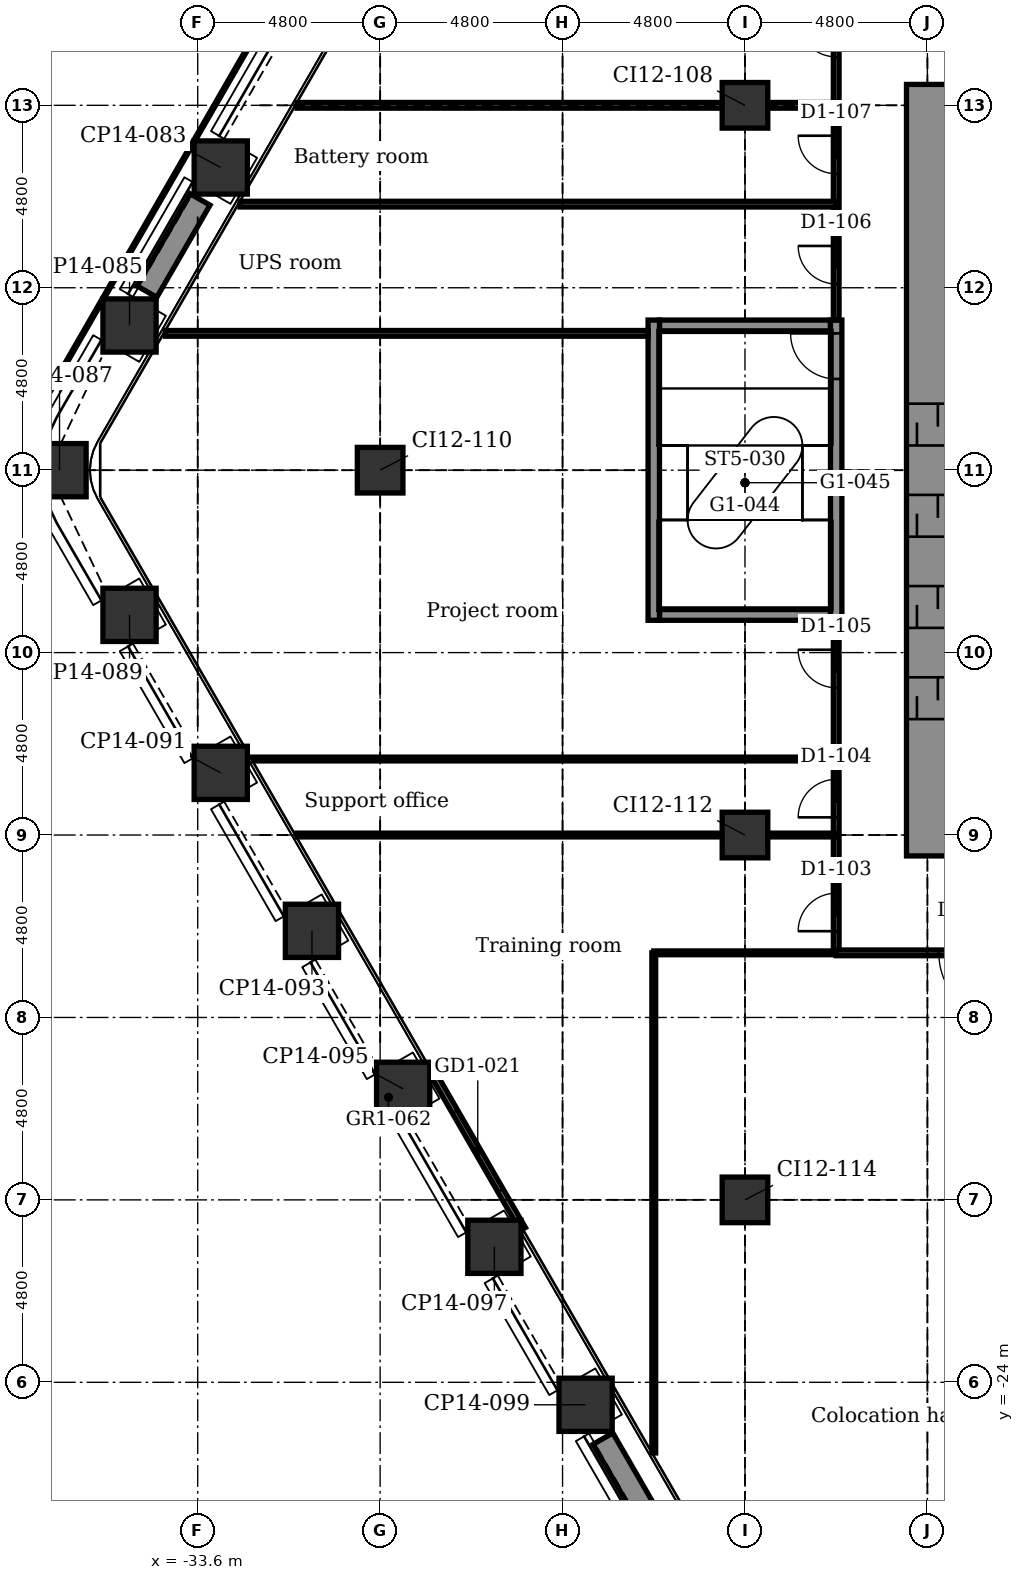
"""IFC4 building model, lengths in metres.
Left out: names, types, materials, properties, quantities, classifications, styles, units other than length and angle.
Written with IfcOpenShell. Run it as: python <this file> out.ifc"""

import sys

from ifc_helpers import new_model, si_unit, direction, frame, frame_2d, origin, origin_2d, place, context, subcontext, project, spatial, rectangle, extrude, element, fill, save


model = new_model("IFC4")
c1 = context("Model", 3, precision=1e-05, world=origin(), true_north=direction((0.0, 1.0)))
c2 = subcontext(c1, "Body", "Model", "MODEL_VIEW")
j1 = project(units=[si_unit("LENGTHUNIT", "METRE"), si_unit("PLANEANGLEUNIT", "RADIAN")], contexts=[c1])
p1 = place(None, origin())
s1 = spatial("IfcSite", under=j1, at=p1, CompositionType="ELEMENT")
p2 = place(p1, origin())
s2 = spatial("IfcBuilding", under=s1, at=p2, CompositionType="ELEMENT")
p3 = place(p2, frame((0.0, 0.0, 38.9)))
s3 = spatial("IfcBuildingStorey", under=s2, at=p3, CompositionType="ELEMENT", Elevation=38.9)
for number, where, z_axis, x_axis in (
    (1, (-23.394, -24.592, -0.25), (0.0, 0.0, 1.0), (0.866, 0.5, 0.0)),
    (2, (-25.794, -20.435, -0.25), (0.0, 0.0, 1.0), (0.866, 0.5, 0.0)),
    (3, (-28.194, -16.278, -0.25), (0.0, 0.0, 1.0), (0.866, 0.5, 0.0)),
    (4, (-30.594, -12.121, -0.25), (0.0, 0.0, 1.0), (0.866, 0.5, 0.0)),
    (5, (-32.994, -7.964, -0.25), (0.0, 0.0, 1.0), (0.866, 0.5, 0.0)),
    (6, (-35.394, -3.807, -0.25), (0.0, 0.0, 1.0), (0.866, 0.5, 0.0)),
    (7, (-37.236, 0.0, -0.25), (0.0, 0.0, 1.0), (1.0, 0.0, 0.0)),
    (8, (-35.394, 3.807, -0.25), (0.0, 0.0, 1.0), (0.5, 0.866, 0.0)),
    (9, (-32.994, 7.964, -0.25), (0.0, 0.0, 1.0), (0.5, 0.866, 0.0)),
):
    element("IfcColumn", number, at=place(p3, frame(where, z_axis=z_axis, x_axis=x_axis)), inside=s3, PredefinedType="COLUMN", context=c2, shape_type="SweptSolid", body=[
        extrude(rectangle(XDim=1.4, YDim=1.4, at=origin_2d()), origin(), (0.0, 0.0, 1.0), 5.5),
    ])
for number, where, z_axis, x_axis in (
    (10, (-28.8, 0.0, -0.25), (0.0, 0.0, 1.0), (1.0, 0.0, 0.0)),
    (11, (-19.2, -19.2, -0.25), (0.0, 0.0, 1.0), (1.0, 0.0, 0.0)),
    (12, (-19.2, -9.6, -0.25), (0.0, 0.0, 1.0), (1.0, 0.0, 0.0)),
    (13, (-19.2, 9.6, -0.25), (0.0, 0.0, 1.0), (1.0, 0.0, 0.0)),
):
    element("IfcColumn", number, at=place(p3, frame(where, z_axis=z_axis, x_axis=x_axis)), inside=s3, PredefinedType="COLUMN", context=c2, shape_type="SweptSolid", body=[
        extrude(rectangle(XDim=1.2, YDim=1.2, at=origin_2d()), origin(), (0.0, 0.0, 1.0), 5.5),
    ])
for number, where, z_axis, x_axis in (
    (14, (-21.45, -3.8, -0.25), (0.0, 0.0, 1.0), (1.0, 0.0, 0.0)),
    (15, (-21.45, 3.8, -0.25), (0.0, 0.0, 1.0), (1.0, 0.0, 0.0)),
):
    element("IfcWall", number, at=place(p3, frame(where, z_axis=z_axis, x_axis=x_axis)), inside=s3, PredefinedType="STANDARD", context=c2, shape_type="SweptSolid", body=[
        extrude(rectangle(XDim=4.5, YDim=0.3, at=frame_2d((2.25, 0.0))), origin(), (0.0, 0.0, 1.0), 5.5),
    ])
p4 = place(p3, frame((-21.6, -3.95, -0.25), z_axis=(0.0, 0.0, 1.0), x_axis=(0.0, 1.0, 0.0)))
e16 = element("IfcWall", 16, at=p4, inside=s3, PredefinedType="STANDARD", context=c2, shape_type="SweptSolid", body=[
    extrude(rectangle(XDim=7.9, YDim=0.3, at=frame_2d((3.95, 0.0))), origin(), (0.0, 0.0, 1.0), 5.5),
])
p5 = place(p3, frame((-16.8, -3.95, -0.25), z_axis=(0.0, 0.0, 1.0), x_axis=(0.0, 1.0, 0.0)))
e17 = element("IfcWall", 17, at=p5, inside=s3, PredefinedType="STANDARD", context=c2, shape_type="SweptSolid", body=[
    extrude(rectangle(XDim=7.9, YDim=0.3, at=frame_2d((3.95, 0.0))), origin(), (0.0, 0.0, 1.0), 5.5),
])
p6 = place(p5, frame((6.35, 0.0, 0.25)))
e18 = element("IfcOpeningElement", 18, at=p6, cuts=e17, PredefinedType="OPENING", context=c2, shape_type="SweptSolid", body=[
    extrude(rectangle(XDim=1.2, YDim=2.1, at=frame_2d((0.6, 1.05))), frame((0.0, 0.16, 0.0), z_axis=(0.0, -1.0, 0.0), x_axis=(1.0, 0.0, 0.0)), (0.0, 0.0, 1.0), 0.32),
])
p7 = place(p3, frame((-14.4, -10.15, -0.25), z_axis=(0.0, 0.0, 1.0), x_axis=(0.0, 1.0, 0.0)))
e19 = element("IfcWall", 19, at=p7, inside=s3, PredefinedType="SHEAR", context=c2, shape_type="SweptSolid", body=[
    extrude(rectangle(XDim=20.3, YDim=1.1, at=frame_2d((10.15, 0.0))), origin(), (0.0, 0.0, 1.0), 5.5),
])
p8 = place(p7, frame((3.6, 0.0, 0.25)))
e20 = element("IfcOpeningElement", 20, at=p8, cuts=e19, PredefinedType="OPENING", context=c2, shape_type="SweptSolid", body=[
    extrude(rectangle(XDim=1.1, YDim=2.1, at=frame_2d((0.55, 1.05))), frame((0.0, 0.56, 0.0), z_axis=(0.0, -1.0, 0.0), x_axis=(1.0, 0.0, 0.0)), (0.0, 0.0, 1.0), 1.12),
])
p9 = place(p7, frame((6.0, 0.0, 0.25)))
e21 = element("IfcOpeningElement", 21, at=p9, cuts=e19, PredefinedType="OPENING", context=c2, shape_type="SweptSolid", body=[
    extrude(rectangle(XDim=1.1, YDim=2.1, at=frame_2d((0.55, 1.05))), frame((0.0, 0.56, 0.0), z_axis=(0.0, -1.0, 0.0), x_axis=(1.0, 0.0, 0.0)), (0.0, 0.0, 1.0), 1.12),
])
p10 = place(p7, frame((8.4, 0.0, 0.25)))
e22 = element("IfcOpeningElement", 22, at=p10, cuts=e19, PredefinedType="OPENING", context=c2, shape_type="SweptSolid", body=[
    extrude(rectangle(XDim=1.1, YDim=2.1, at=frame_2d((0.55, 1.05))), frame((0.0, 0.56, 0.0), z_axis=(0.0, -1.0, 0.0), x_axis=(1.0, 0.0, 0.0)), (0.0, 0.0, 1.0), 1.12),
])
p11 = place(p7, frame((10.8, 0.0, 0.25)))
e23 = element("IfcOpeningElement", 23, at=p11, cuts=e19, PredefinedType="OPENING", context=c2, shape_type="SweptSolid", body=[
    extrude(rectangle(XDim=1.1, YDim=2.1, at=frame_2d((0.55, 1.05))), frame((0.0, 0.56, 0.0), z_axis=(0.0, -1.0, 0.0), x_axis=(1.0, 0.0, 0.0)), (0.0, 0.0, 1.0), 1.12),
])
p12 = place(p3, frame((-25.047, -19.969, 0.0), z_axis=(0.0, 0.0, 1.0), x_axis=(-0.5000167099, 0.866015756104, 0.0)))
e24 = element("IfcWall", 24, at=p12, inside=s3, PredefinedType="PARTITIONING", context=c2, shape_type="SweptSolid", body=[
    extrude(rectangle(XDim=4.74, YDim=0.16, at=frame_2d((2.37, 0.0))), origin(), (0.0, 0.0, 1.0), 5.25),
])
p13 = place(p12, frame((1.17, 0.0, 0.0)))
e25 = element("IfcOpeningElement", 25, at=p13, cuts=e24, PredefinedType="OPENING", context=c2, shape_type="SweptSolid", body=[
    extrude(rectangle(XDim=2.4, YDim=2.4, at=frame_2d((1.2, 1.2))), frame((0.0, 0.09, 0.0), z_axis=(0.0, -1.0, 0.0), x_axis=(1.0, 0.0, 0.0)), (0.0, 0.0, 1.0), 0.18),
])
for number, where, z_axis, x_axis in (
    (26, (-21.537, -27.907, 0.0), (0.0, 0.0, 1.0), (-0.5, 0.866, 0.0)),
    (27, (-34.937, 4.698, 0.0), (0.0, 0.0, 1.0), (0.5, 0.866, 0.0)),
):
    element("IfcWall", number, at=place(p3, frame(where, z_axis=z_axis, x_axis=x_axis)), inside=s3, PredefinedType="USERDEFINED", context=c2, shape_type="SweptSolid", body=[
        extrude(rectangle(XDim=2.8, YDim=0.6, at=frame_2d((1.4, 0.0))), origin(), (0.0, 0.0, 1.0), 0.7),
    ])
p14 = place(p3, frame((-16.8, -12.7, 0.0), z_axis=(0.0, 0.0, 1.0), x_axis=(0.0, 1.0, 0.0)))
e28 = element("IfcWall", 28, at=p14, inside=s3, PredefinedType="PARTITIONING", context=c2, shape_type="SweptSolid", body=[
    extrude(rectangle(XDim=8.75, YDim=0.15, at=frame_2d((4.375, 0.0))), origin(), (0.0, 0.0, 1.0), 5.25),
])
p15 = place(p14, frame((0.57, 0.0, 0.0)))
e29 = element("IfcOpeningElement", 29, at=p15, cuts=e28, PredefinedType="OPENING", context=c2, shape_type="SweptSolid", body=[
    extrude(rectangle(XDim=1.0, YDim=2.1, at=frame_2d((0.5, 1.05))), frame((0.0, 0.085, 0.0), z_axis=(0.0, -1.0, 0.0), x_axis=(1.0, 0.0, 0.0)), (0.0, 0.0, 1.0), 0.17),
])
p16 = place(p14, frame((3.565, 0.0, 0.0)))
e30 = element("IfcOpeningElement", 30, at=p16, cuts=e28, PredefinedType="OPENING", context=c2, shape_type="SweptSolid", body=[
    extrude(rectangle(XDim=1.0, YDim=2.1, at=frame_2d((0.5, 1.05))), frame((0.0, 0.085, 0.0), z_axis=(0.0, -1.0, 0.0), x_axis=(1.0, 0.0, 0.0)), (0.0, 0.0, 1.0), 0.17),
])
p17 = place(p14, frame((6.975, 0.0, 0.0)))
e31 = element("IfcOpeningElement", 31, at=p17, cuts=e28, PredefinedType="OPENING", context=c2, shape_type="SweptSolid", body=[
    extrude(rectangle(XDim=1.0, YDim=2.1, at=frame_2d((0.5, 1.05))), frame((0.0, 0.085, 0.0), z_axis=(0.0, -1.0, 0.0), x_axis=(1.0, 0.0, 0.0)), (0.0, 0.0, 1.0), 0.17),
])
p18 = place(p3, frame((-16.8, 3.95, 0.0), z_axis=(0.0, 0.0, 1.0), x_axis=(0.0, 1.0, 0.0)))
e32 = element("IfcWall", 32, at=p18, inside=s3, PredefinedType="PARTITIONING", context=c2, shape_type="SweptSolid", body=[
    extrude(rectangle(XDim=8.45, YDim=0.15, at=frame_2d((4.225, 0.0))), origin(), (0.0, 0.0, 1.0), 5.25),
])
p19 = place(p18, frame((0.95, 0.0, 0.0)))
e33 = element("IfcOpeningElement", 33, at=p19, cuts=e32, PredefinedType="OPENING", context=c2, shape_type="SweptSolid", body=[
    extrude(rectangle(XDim=1.0, YDim=2.1, at=frame_2d((0.5, 1.05))), frame((0.0, 0.085, 0.0), z_axis=(0.0, -1.0, 0.0), x_axis=(1.0, 0.0, 0.0)), (0.0, 0.0, 1.0), 0.17),
])
p20 = place(p18, frame((3.85, 0.0, 0.0)))
e34 = element("IfcOpeningElement", 34, at=p20, cuts=e32, PredefinedType="OPENING", context=c2, shape_type="SweptSolid", body=[
    extrude(rectangle(XDim=1.0, YDim=2.1, at=frame_2d((0.5, 1.05))), frame((0.0, 0.085, 0.0), z_axis=(0.0, -1.0, 0.0), x_axis=(1.0, 0.0, 0.0)), (0.0, 0.0, 1.0), 0.17),
])
p21 = place(p18, frame((6.925, 0.0, 0.0)))
e35 = element("IfcOpeningElement", 35, at=p21, cuts=e32, PredefinedType="OPENING", context=c2, shape_type="SweptSolid", body=[
    extrude(rectangle(XDim=1.0, YDim=2.1, at=frame_2d((0.5, 1.05))), frame((0.0, 0.085, 0.0), z_axis=(0.0, -1.0, 0.0), x_axis=(1.0, 0.0, 0.0)), (0.0, 0.0, 1.0), 0.17),
])
p22 = place(p3, frame((-21.6, -25.858, 0.0), z_axis=(0.0, 0.0, 1.0), x_axis=(0.0, 1.0, 0.0)))
e36 = element("IfcWall", 36, at=p22, inside=s3, PredefinedType="PARTITIONING", context=c2, shape_type="SweptSolid", body=[
    extrude(rectangle(XDim=13.158, YDim=0.1, at=frame_2d((6.579, 0.0))), origin(), (0.0, 0.0, 1.0), 5.25),
])
p23 = place(p3, frame((-21.6, -12.7, 0.0), z_axis=(0.0, 0.0, 1.0), x_axis=(1.0, 0.0, 0.0)))
e37 = element("IfcWall", 37, at=p23, inside=s3, PredefinedType="PARTITIONING", context=c2, shape_type="SweptSolid", body=[
    extrude(rectangle(XDim=4.8, YDim=0.1, at=frame_2d((2.4, 0.0))), origin(), (0.0, 0.0, 1.0), 5.25),
])
p24 = place(p3, frame((-16.8, -12.7, 0.0), z_axis=(0.0, 0.0, 1.0), x_axis=(1.0, 0.0, 0.0)))
e38 = element("IfcWall", 38, at=p24, inside=s3, PredefinedType="PARTITIONING", context=c2, shape_type="SweptSolid", body=[
    extrude(rectangle(XDim=38.4, YDim=0.15, at=frame_2d((19.2, 0.0))), origin(), (0.0, 0.0, 1.0), 5.25),
])
p25 = place(p24, frame((2.7, 0.0, 0.0)))
e39 = element("IfcOpeningElement", 39, at=p25, cuts=e38, PredefinedType="OPENING", context=c2, shape_type="SweptSolid", body=[
    extrude(rectangle(XDim=1.8, YDim=2.1, at=frame_2d((0.9, 1.05))), frame((0.0, 0.085, 0.0), z_axis=(0.0, -1.0, 0.0), x_axis=(1.0, 0.0, 0.0)), (0.0, 0.0, 1.0), 0.17),
])
p26 = place(p24, frame((14.415, 0.0, 0.0)))
e40 = element("IfcOpeningElement", 40, at=p26, cuts=e38, PredefinedType="OPENING", context=c2, shape_type="SweptSolid", body=[
    extrude(rectangle(XDim=1.0, YDim=2.1, at=frame_2d((0.5, 1.05))), frame((0.0, 0.085, 0.0), z_axis=(0.0, -1.0, 0.0), x_axis=(1.0, 0.0, 0.0)), (0.0, 0.0, 1.0), 0.17),
])
p27 = place(p24, frame((21.1, 0.0, 0.0)))
e41 = element("IfcOpeningElement", 41, at=p27, cuts=e38, PredefinedType="OPENING", context=c2, shape_type="SweptSolid", body=[
    extrude(rectangle(XDim=1.0, YDim=2.1, at=frame_2d((0.5, 1.05))), frame((0.0, 0.085, 0.0), z_axis=(0.0, -1.0, 0.0), x_axis=(1.0, 0.0, 0.0)), (0.0, 0.0, 1.0), 0.17),
])
p28 = place(p24, frame((29.5, 0.0, 0.0)))
e42 = element("IfcOpeningElement", 42, at=p28, cuts=e38, PredefinedType="OPENING", context=c2, shape_type="SweptSolid", body=[
    extrude(rectangle(XDim=1.0, YDim=2.1, at=frame_2d((0.5, 1.05))), frame((0.0, 0.085, 0.0), z_axis=(0.0, -1.0, 0.0), x_axis=(1.0, 0.0, 0.0)), (0.0, 0.0, 1.0), 0.17),
])
p29 = place(p24, frame((9.15, 0.0, 0.0)))
e43 = element("IfcOpeningElement", 43, at=p29, cuts=e38, PredefinedType="OPENING", context=c2, shape_type="SweptSolid", body=[
    extrude(rectangle(XDim=0.9, YDim=2.1, at=frame_2d((0.45, 1.05))), frame((0.0, 0.085, 0.0), z_axis=(0.0, -1.0, 0.0), x_axis=(1.0, 0.0, 0.0)), (0.0, 0.0, 1.0), 0.17),
])
p30 = place(p24, frame((12.15, 0.0, 0.0)))
e44 = element("IfcOpeningElement", 44, at=p30, cuts=e38, PredefinedType="OPENING", context=c2, shape_type="SweptSolid", body=[
    extrude(rectangle(XDim=0.9, YDim=2.1, at=frame_2d((0.45, 1.05))), frame((0.0, 0.085, 0.0), z_axis=(0.0, -1.0, 0.0), x_axis=(1.0, 0.0, 0.0)), (0.0, 0.0, 1.0), 0.17),
])
p31 = place(p3, frame((-30.987, -9.6, 0.0), z_axis=(0.0, 0.0, 1.0), x_axis=(1.0, 0.0, 0.0)))
e45 = element("IfcWall", 45, at=p31, inside=s3, PredefinedType="PARTITIONING", context=c2, shape_type="SweptSolid", body=[
    extrude(rectangle(XDim=11.187, YDim=0.1, at=frame_2d((5.593, 0.0))), origin(), (0.0, 0.0, 1.0), 4.488),
])
p32 = place(p3, frame((-18.6, -9.6, 0.0), z_axis=(0.0, 0.0, 1.0), x_axis=(1.0, 0.0, 0.0)))
e46 = element("IfcWall", 46, at=p32, inside=s3, PredefinedType="PARTITIONING", context=c2, shape_type="SweptSolid", body=[
    extrude(rectangle(XDim=1.8, YDim=0.1, at=frame_2d((0.9, 0.0))), origin(), (0.0, 0.0, 1.0), 4.642),
])
p33 = place(p3, frame((-32.142, -7.6, 0.0), z_axis=(0.0, 0.0, 1.0), x_axis=(1.0, 0.0, 0.0)))
e47 = element("IfcWall", 47, at=p33, inside=s3, PredefinedType="PARTITIONING", context=c2, shape_type="SweptSolid", body=[
    extrude(rectangle(XDim=15.342, YDim=0.1, at=frame_2d((7.671, 0.0))), origin(), (0.0, 0.0, 1.0), 5.25),
])
p34 = place(p3, frame((-34.451, 3.6, 0.0), z_axis=(0.0, 0.0, 1.0), x_axis=(1.0, 0.0, 0.0)))
e48 = element("IfcWall", 48, at=p34, inside=s3, PredefinedType="PARTITIONING", context=c2, shape_type="SweptSolid", body=[
    extrude(rectangle(XDim=12.701, YDim=0.15, at=frame_2d((6.351, 0.0))), origin(), (0.0, 0.0, 1.0), 5.25),
])
p35 = place(p3, frame((-32.488, 7.0, 0.0), z_axis=(0.0, 0.0, 1.0), x_axis=(1.0, 0.0, 0.0)))
e49 = element("IfcWall", 49, at=p35, inside=s3, PredefinedType="PARTITIONING", context=c2, shape_type="SweptSolid", body=[
    extrude(rectangle(XDim=15.688, YDim=0.15, at=frame_2d((7.844, 0.0))), origin(), (0.0, 0.0, 1.0), 5.25),
])
p36 = place(p3, frame((-30.987, 9.6, 0.0), z_axis=(0.0, 0.0, 1.0), x_axis=(1.0, 0.0, 0.0)))
e50 = element("IfcWall", 50, at=p36, inside=s3, PredefinedType="PARTITIONING", context=c2, shape_type="SweptSolid", body=[
    extrude(rectangle(XDim=11.187, YDim=0.15, at=frame_2d((5.593, 0.0))), origin(), (0.0, 0.0, 1.0), 4.488),
])
p37 = place(p3, frame((-18.6, 9.6, 0.0), z_axis=(0.0, 0.0, 1.0), x_axis=(1.0, 0.0, 0.0)))
e51 = element("IfcWall", 51, at=p37, inside=s3, PredefinedType="PARTITIONING", context=c2, shape_type="SweptSolid", body=[
    extrude(rectangle(XDim=1.8, YDim=0.15, at=frame_2d((0.9, 0.0))), origin(), (0.0, 0.0, 1.0), 4.642),
])
p38 = place(p13, origin())
e52 = element("IfcDoor", 52, at=p38, inside=s3, OperationType="DOUBLE_DOOR_SLIDING", PredefinedType="DOOR", context=c2, shape_type="SweptSolid", body=[
    extrude(rectangle(XDim=2.4, YDim=2.4, at=frame_2d((1.2, 1.2))), frame((0.0, 0.025, 0.0), z_axis=(0.0, -1.0, 0.0), x_axis=(1.0, 0.0, 0.0)), (0.0, 0.0, 1.0), 0.05),
])
fill(e25, e52)
p39 = place(p25, frame((1.8, 0.0, 0.0), z_axis=(0.0, 0.0, 1.0), x_axis=(-1.0, 0.0, 0.0)))
e53 = element("IfcDoor", 53, at=p39, inside=s3, OperationType="SINGLE_SWING_RIGHT", PredefinedType="DOOR", context=c2, shape_type="SweptSolid", body=[
    extrude(rectangle(XDim=1.8, YDim=2.1, at=frame_2d((0.9, 1.05))), frame((0.0, 0.025, 0.0), z_axis=(0.0, -1.0, 0.0), x_axis=(1.0, 0.0, 0.0)), (0.0, 0.0, 1.0), 0.05),
])
fill(e39, e53)
p40 = place(p15, origin())
e54 = element("IfcDoor", 54, at=p40, inside=s3, OperationType="SINGLE_SWING_LEFT", PredefinedType="DOOR", context=c2, shape_type="SweptSolid", body=[
    extrude(rectangle(XDim=1.0, YDim=2.1, at=frame_2d((0.5, 1.05))), frame((0.0, 0.025, 0.0), z_axis=(0.0, -1.0, 0.0), x_axis=(1.0, 0.0, 0.0)), (0.0, 0.0, 1.0), 0.05),
])
fill(e29, e54)
p41 = place(p16, origin())
e55 = element("IfcDoor", 55, at=p41, inside=s3, OperationType="SINGLE_SWING_LEFT", PredefinedType="DOOR", context=c2, shape_type="SweptSolid", body=[
    extrude(rectangle(XDim=1.0, YDim=2.1, at=frame_2d((0.5, 1.05))), frame((0.0, 0.025, 0.0), z_axis=(0.0, -1.0, 0.0), x_axis=(1.0, 0.0, 0.0)), (0.0, 0.0, 1.0), 0.05),
])
fill(e30, e55)
p42 = place(p17, origin())
e56 = element("IfcDoor", 56, at=p42, inside=s3, OperationType="SINGLE_SWING_RIGHT", PredefinedType="DOOR", context=c2, shape_type="SweptSolid", body=[
    extrude(rectangle(XDim=1.0, YDim=2.1, at=frame_2d((0.5, 1.05))), frame((0.0, 0.025, 0.0), z_axis=(0.0, -1.0, 0.0), x_axis=(1.0, 0.0, 0.0)), (0.0, 0.0, 1.0), 0.05),
])
fill(e31, e56)
p43 = place(p19, origin())
e57 = element("IfcDoor", 57, at=p43, inside=s3, OperationType="SINGLE_SWING_RIGHT", PredefinedType="DOOR", context=c2, shape_type="SweptSolid", body=[
    extrude(rectangle(XDim=1.0, YDim=2.1, at=frame_2d((0.5, 1.05))), frame((0.0, 0.025, 0.0), z_axis=(0.0, -1.0, 0.0), x_axis=(1.0, 0.0, 0.0)), (0.0, 0.0, 1.0), 0.05),
])
fill(e33, e57)
p44 = place(p20, origin())
e58 = element("IfcDoor", 58, at=p44, inside=s3, OperationType="SINGLE_SWING_RIGHT", PredefinedType="DOOR", context=c2, shape_type="SweptSolid", body=[
    extrude(rectangle(XDim=1.0, YDim=2.1, at=frame_2d((0.5, 1.05))), frame((0.0, 0.025, 0.0), z_axis=(0.0, -1.0, 0.0), x_axis=(1.0, 0.0, 0.0)), (0.0, 0.0, 1.0), 0.05),
])
fill(e34, e58)
p45 = place(p21, origin())
e59 = element("IfcDoor", 59, at=p45, inside=s3, OperationType="SINGLE_SWING_RIGHT", PredefinedType="DOOR", context=c2, shape_type="SweptSolid", body=[
    extrude(rectangle(XDim=1.0, YDim=2.1, at=frame_2d((0.5, 1.05))), frame((0.0, 0.025, 0.0), z_axis=(0.0, -1.0, 0.0), x_axis=(1.0, 0.0, 0.0)), (0.0, 0.0, 1.0), 0.05),
])
fill(e35, e59)
p46 = place(p8, origin())
e60 = element("IfcDoor", 60, at=p46, inside=s3, OperationType="DOUBLE_DOOR_SLIDING", PredefinedType="DOOR", context=c2, shape_type="SweptSolid", body=[
    extrude(rectangle(XDim=1.1, YDim=2.1, at=frame_2d((0.55, 1.05))), frame((0.0, 0.025, 0.0), z_axis=(0.0, -1.0, 0.0), x_axis=(1.0, 0.0, 0.0)), (0.0, 0.0, 1.0), 0.05),
])
fill(e20, e60)
p47 = place(p9, origin())
e61 = element("IfcDoor", 61, at=p47, inside=s3, OperationType="DOUBLE_DOOR_SLIDING", PredefinedType="DOOR", context=c2, shape_type="SweptSolid", body=[
    extrude(rectangle(XDim=1.1, YDim=2.1, at=frame_2d((0.55, 1.05))), frame((0.0, 0.025, 0.0), z_axis=(0.0, -1.0, 0.0), x_axis=(1.0, 0.0, 0.0)), (0.0, 0.0, 1.0), 0.05),
])
fill(e21, e61)
p48 = place(p10, origin())
e62 = element("IfcDoor", 62, at=p48, inside=s3, OperationType="DOUBLE_DOOR_SLIDING", PredefinedType="DOOR", context=c2, shape_type="SweptSolid", body=[
    extrude(rectangle(XDim=1.1, YDim=2.1, at=frame_2d((0.55, 1.05))), frame((0.0, 0.025, 0.0), z_axis=(0.0, -1.0, 0.0), x_axis=(1.0, 0.0, 0.0)), (0.0, 0.0, 1.0), 0.05),
])
fill(e22, e62)
p49 = place(p11, origin())
e63 = element("IfcDoor", 63, at=p49, inside=s3, OperationType="DOUBLE_DOOR_SLIDING", PredefinedType="DOOR", context=c2, shape_type="SweptSolid", body=[
    extrude(rectangle(XDim=1.1, YDim=2.1, at=frame_2d((0.55, 1.05))), frame((0.0, 0.025, 0.0), z_axis=(0.0, -1.0, 0.0), x_axis=(1.0, 0.0, 0.0)), (0.0, 0.0, 1.0), 0.05),
])
fill(e23, e63)
p50 = place(p6, origin())
e64 = element("IfcDoor", 64, at=p50, inside=s3, OperationType="SINGLE_SWING_RIGHT", PredefinedType="DOOR", context=c2, shape_type="SweptSolid", body=[
    extrude(rectangle(XDim=1.2, YDim=2.1, at=frame_2d((0.6, 1.05))), frame((0.0, 0.025, 0.0), z_axis=(0.0, -1.0, 0.0), x_axis=(1.0, 0.0, 0.0)), (0.0, 0.0, 1.0), 0.05),
])
fill(e18, e64)
save(model, sys.argv[1])
